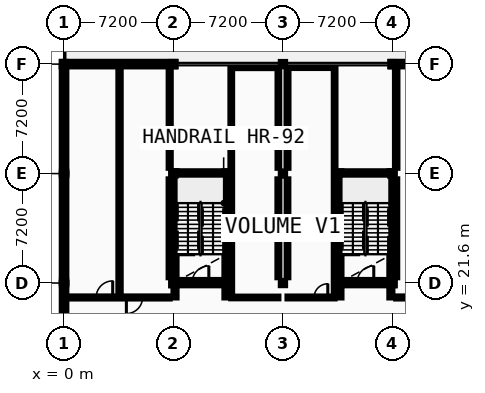
"""IFC4 building model, lengths in metres.
Left out: names, types, materials, properties, quantities, classifications, styles, units other than length and angle.
Written with IfcOpenShell. Run it as: python <this file> out.ifc"""

import sys

from ifc_helpers import new_model, si_unit, direction, frame, frame_2d, origin, origin_2d, place, context, subcontext, project, spatial, rectangle, i_section, extrude, element, fill, save


model = new_model("IFC4")
c1 = context("Model", 3, precision=1e-05, world=origin(), true_north=direction((0.0, 1.0)))
c2 = subcontext(c1, "Body", "Model", "MODEL_VIEW")
j1 = project(units=[si_unit("LENGTHUNIT", "METRE"), si_unit("PLANEANGLEUNIT", "RADIAN")], contexts=[c1])
p1 = place(None, origin())
s1 = spatial("IfcSite", under=j1, at=p1, CompositionType="ELEMENT")
p2 = place(p1, origin())
s2 = spatial("IfcBuilding", under=s1, at=p2, CompositionType="ELEMENT")
p3 = place(p2, frame((0.0, 0.0, 27.2)))
s3 = spatial("IfcBuildingStorey", under=s2, at=p3, CompositionType="ELEMENT", Elevation=27.2)
for number, where, z_axis, x_axis in (
    (1, (0.0, 21.6, 0.0), (0.0, 0.0, 1.0), (1.0, 0.0, 0.0)),
    (2, (0.0, 28.8, 0.0), (0.0, 0.0, 1.0), (1.0, 0.0, 0.0)),
    (3, (0.0, 36.0, 0.0), (0.0, 0.0, 1.0), (1.0, 0.0, 0.0)),
    (4, (7.2, 21.6, 0.0), (0.0, 0.0, 1.0), (1.0, 0.0, 0.0)),
    (5, (7.2, 28.8, 0.0), (0.0, 0.0, 1.0), (1.0, 0.0, 0.0)),
    (6, (7.2, 36.0, 0.0), (0.0, 0.0, 1.0), (1.0, 0.0, 0.0)),
    (7, (14.4, 21.6, 0.0), (0.0, 0.0, 1.0), (1.0, 0.0, 0.0)),
    (8, (14.4, 28.8, 0.0), (0.0, 0.0, 1.0), (1.0, 0.0, 0.0)),
    (9, (14.4, 36.0, 0.0), (0.0, 0.0, 1.0), (1.0, 0.0, 0.0)),
    (10, (21.6, 21.6, 0.0), (0.0, 0.0, 1.0), (1.0, 0.0, 0.0)),
    (11, (21.6, 28.8, 0.0), (0.0, 0.0, 1.0), (1.0, 0.0, 0.0)),
    (12, (21.6, 36.0, 0.0), (0.0, 0.0, 1.0), (1.0, 0.0, 0.0)),
):
    element("IfcColumn", number, at=place(p3, frame(where, z_axis=z_axis, x_axis=x_axis)), inside=s3, PredefinedType="COLUMN", context=c2, shape_type="SweptSolid", body=[
        extrude(i_section(OverallWidth=0.28, OverallDepth=0.28, WebThickness=0.01, FlangeThickness=0.018, FilletRadius=0.024, at=origin_2d()), origin(), (0.0, 0.0, 1.0), 4.4),
    ])
p4 = place(p3, frame((7.31, 36.0, 0.0), z_axis=(0.0, 0.0, 1.0), x_axis=(-1.0, 0.0, 0.0)))
e13 = element("IfcWall", 13, at=p4, inside=s3, PredefinedType="STANDARD", context=c2, shape_type="SweptSolid", body=[
    extrude(rectangle(XDim=7.46, YDim=0.3, at=frame_2d((3.73, 0.0))), origin(), (0.0, 0.0, 1.0), 4.035),
])
p5 = place(p3, frame((28.8, 36.0, 0.0), z_axis=(0.0, 0.0, 1.0), x_axis=(-1.0, 0.0, 0.0)))
e14 = element("IfcWall", 14, at=p5, inside=s3, PredefinedType="STANDARD", context=c2, shape_type="SweptSolid", body=[
    extrude(rectangle(XDim=7.31, YDim=0.3, at=frame_2d((3.655, 0.0))), origin(), (0.0, 0.0, 1.0), 4.035),
])
p6 = place(p5, frame((1.062, 0.0, 0.0)))
e15 = element("IfcOpeningElement", 15, at=p6, cuts=e14, PredefinedType="OPENING", context=c2, shape_type="SweptSolid", body=[
    extrude(rectangle(XDim=1.6, YDim=2.2, at=frame_2d((0.8, 1.1))), frame((0.0, 0.16, 0.0), z_axis=(0.0, -1.0, 0.0), x_axis=(1.0, 0.0, 0.0)), (0.0, 0.0, 1.0), 0.32),
])
p7 = place(p3, frame((0.0, 21.6, 0.0), z_axis=(0.0, 0.0, 1.0), x_axis=(0.0, -1.0, 0.0)))
e16 = element("IfcWall", 16, at=p7, inside=s3, PredefinedType="STANDARD", context=c2, shape_type="SweptSolid", body=[
    extrude(rectangle(XDim=7.15, YDim=0.3, at=frame_2d((3.575, 0.0))), origin(), (0.0, 0.0, 1.0), 4.18),
])
p8 = place(p7, frame((1.596, 0.0, 0.95)))
e17 = element("IfcOpeningElement", 17, at=p8, cuts=e16, PredefinedType="OPENING", context=c2, shape_type="SweptSolid", body=[
    extrude(rectangle(XDim=1.098, YDim=1.26, at=frame_2d((0.549, 0.63))), frame((0.0, 0.16, 0.0), z_axis=(0.0, -1.0, 0.0), x_axis=(1.0, 0.0, 0.0)), (0.0, 0.0, 1.0), 0.32),
])
p9 = place(p7, frame((4.456, 0.0, 0.95)))
e18 = element("IfcOpeningElement", 18, at=p9, cuts=e16, PredefinedType="OPENING", context=c2, shape_type="SweptSolid", body=[
    extrude(rectangle(XDim=1.098, YDim=1.26, at=frame_2d((0.549, 0.63))), frame((0.0, 0.16, 0.0), z_axis=(0.0, -1.0, 0.0), x_axis=(1.0, 0.0, 0.0)), (0.0, 0.0, 1.0), 0.32),
])
p10 = place(p3, frame((0.0, 28.8, 0.0), z_axis=(0.0, 0.0, 1.0), x_axis=(0.0, -1.0, 0.0)))
e19 = element("IfcWall", 19, at=p10, inside=s3, PredefinedType="STANDARD", context=c2, shape_type="SweptSolid", body=[
    extrude(rectangle(XDim=7.2, YDim=0.3, at=frame_2d((3.6, 0.0))), origin(), (0.0, 0.0, 1.0), 4.11),
])
p11 = place(p10, frame((1.594, 0.0, 0.95)))
e20 = element("IfcOpeningElement", 20, at=p11, cuts=e19, PredefinedType="OPENING", context=c2, shape_type="SweptSolid", body=[
    extrude(rectangle(XDim=1.132, YDim=1.26, at=frame_2d((0.566, 0.63))), frame((0.0, 0.16, 0.0), z_axis=(0.0, -1.0, 0.0), x_axis=(1.0, 0.0, 0.0)), (0.0, 0.0, 1.0), 0.32),
])
p12 = place(p10, frame((4.474, 0.0, 0.95)))
e21 = element("IfcOpeningElement", 21, at=p12, cuts=e19, PredefinedType="OPENING", context=c2, shape_type="SweptSolid", body=[
    extrude(rectangle(XDim=1.132, YDim=1.26, at=frame_2d((0.566, 0.63))), frame((0.0, 0.16, 0.0), z_axis=(0.0, -1.0, 0.0), x_axis=(1.0, 0.0, 0.0)), (0.0, 0.0, 1.0), 0.32),
])
p13 = place(p3, frame((0.0, 35.85, 0.0), z_axis=(0.0, 0.0, 1.0), x_axis=(0.0, -1.0, 0.0)))
e22 = element("IfcWall", 22, at=p13, inside=s3, PredefinedType="STANDARD", context=c2, shape_type="SweptSolid", body=[
    extrude(rectangle(XDim=7.05, YDim=0.3, at=frame_2d((3.525, 0.0))), origin(), (0.0, 0.0, 1.0), 4.11),
])
p14 = place(p13, frame((1.532, 0.0, 0.95)))
e23 = element("IfcOpeningElement", 23, at=p14, cuts=e22, PredefinedType="OPENING", context=c2, shape_type="SweptSolid", body=[
    extrude(rectangle(XDim=1.166, YDim=1.26, at=frame_2d((0.583, 0.63))), frame((0.0, 0.16, 0.0), z_axis=(0.0, -1.0, 0.0), x_axis=(1.0, 0.0, 0.0)), (0.0, 0.0, 1.0), 0.32),
])
p15 = place(p13, frame((4.352, 0.0, 0.95)))
e24 = element("IfcOpeningElement", 24, at=p15, cuts=e22, PredefinedType="OPENING", context=c2, shape_type="SweptSolid", body=[
    extrude(rectangle(XDim=1.166, YDim=1.26, at=frame_2d((0.583, 0.63))), frame((0.0, 0.16, 0.0), z_axis=(0.0, -1.0, 0.0), x_axis=(1.0, 0.0, 0.0)), (0.0, 0.0, 1.0), 0.32),
])
p16 = place(p3, frame((7.4, 21.625, 0.0), z_axis=(0.0, 0.0, 1.0), x_axis=(1.0, 0.0, 0.0)))
e25 = element("IfcWall", 25, at=p16, inside=s3, PredefinedType="SHEAR", context=c2, shape_type="SweptSolid", body=[
    extrude(rectangle(XDim=3.15, YDim=0.35, at=frame_2d((1.575, 0.0))), origin(), (0.0, 0.0, 1.0), 4.2),
])
p17 = place(p16, frame((1.025, 0.0, 0.0)))
e26 = element("IfcOpeningElement", 26, at=p17, cuts=e25, PredefinedType="OPENING", context=c2, shape_type="SweptSolid", body=[
    extrude(rectangle(XDim=1.1, YDim=2.15, at=frame_2d((0.55, 1.075))), frame((0.0, 0.185, 0.0), z_axis=(0.0, -1.0, 0.0), x_axis=(1.0, 0.0, 0.0)), (0.0, 0.0, 1.0), 0.37),
])
p18 = place(p3, frame((7.4, 28.775, 0.0), z_axis=(0.0, 0.0, 1.0), x_axis=(1.0, 0.0, 0.0)))
e27 = element("IfcWall", 27, at=p18, inside=s3, PredefinedType="SHEAR", context=c2, shape_type="SweptSolid", body=[
    extrude(rectangle(XDim=3.15, YDim=0.35, at=frame_2d((1.575, 0.0))), origin(), (0.0, 0.0, 1.0), 4.2),
])
for number, where, z_axis, x_axis in (
    (28, (7.225, 21.45, 0.0), (0.0, 0.0, 1.0), (0.0, 1.0, 0.0)),
    (29, (10.725, 21.45, 0.0), (0.0, 0.0, 1.0), (0.0, 1.0, 0.0)),
):
    element("IfcWall", number, at=place(p3, frame(where, z_axis=z_axis, x_axis=x_axis)), inside=s3, PredefinedType="SHEAR", context=c2, shape_type="SweptSolid", body=[
        extrude(rectangle(XDim=7.5, YDim=0.35, at=frame_2d((3.75, 0.0))), origin(), (0.0, 0.0, 1.0), 4.2),
    ])
for number, where, z_axis, x_axis in (
    (30, (7.3, 20.65, 0.0), (0.0, 0.0, 1.0), (0.0, 1.0, 0.0)),
    (31, (10.65, 20.65, 0.0), (0.0, 0.0, 1.0), (0.0, 1.0, 0.0)),
):
    element("IfcWall", number, at=place(p3, frame(where, z_axis=z_axis, x_axis=x_axis)), inside=s3, PredefinedType="PARTITIONING", context=c2, shape_type="SweptSolid", body=[
        extrude(rectangle(XDim=0.8, YDim=0.2, at=frame_2d((0.4, 0.0))), origin(), (0.0, 0.0, 1.0), 3.85),
    ])
p19 = place(p3, frame((18.25, 21.625, 0.0), z_axis=(0.0, 0.0, 1.0), x_axis=(1.0, 0.0, 0.0)))
e32 = element("IfcWall", 32, at=p19, inside=s3, PredefinedType="SHEAR", context=c2, shape_type="SweptSolid", body=[
    extrude(rectangle(XDim=3.15, YDim=0.35, at=frame_2d((1.575, 0.0))), origin(), (0.0, 0.0, 1.0), 4.2),
])
p20 = place(p19, frame((1.025, 0.0, 0.0)))
e33 = element("IfcOpeningElement", 33, at=p20, cuts=e32, PredefinedType="OPENING", context=c2, shape_type="SweptSolid", body=[
    extrude(rectangle(XDim=1.1, YDim=2.15, at=frame_2d((0.55, 1.075))), frame((0.0, 0.185, 0.0), z_axis=(0.0, -1.0, 0.0), x_axis=(1.0, 0.0, 0.0)), (0.0, 0.0, 1.0), 0.37),
])
p21 = place(p3, frame((18.25, 28.775, 0.0), z_axis=(0.0, 0.0, 1.0), x_axis=(1.0, 0.0, 0.0)))
e34 = element("IfcWall", 34, at=p21, inside=s3, PredefinedType="SHEAR", context=c2, shape_type="SweptSolid", body=[
    extrude(rectangle(XDim=3.15, YDim=0.35, at=frame_2d((1.575, 0.0))), origin(), (0.0, 0.0, 1.0), 4.2),
])
for number, where, z_axis, x_axis in (
    (35, (18.075, 21.45, 0.0), (0.0, 0.0, 1.0), (0.0, 1.0, 0.0)),
    (36, (21.575, 21.45, 0.0), (0.0, 0.0, 1.0), (0.0, 1.0, 0.0)),
):
    element("IfcWall", number, at=place(p3, frame(where, z_axis=z_axis, x_axis=x_axis)), inside=s3, PredefinedType="SHEAR", context=c2, shape_type="SweptSolid", body=[
        extrude(rectangle(XDim=7.5, YDim=0.35, at=frame_2d((3.75, 0.0))), origin(), (0.0, 0.0, 1.0), 4.2),
    ])
for number, where, z_axis, x_axis in (
    (37, (18.15, 20.65, 0.0), (0.0, 0.0, 1.0), (0.0, 1.0, 0.0)),
    (38, (21.5, 20.65, 0.0), (0.0, 0.0, 1.0), (0.0, 1.0, 0.0)),
):
    element("IfcWall", number, at=place(p3, frame(where, z_axis=z_axis, x_axis=x_axis)), inside=s3, PredefinedType="PARTITIONING", context=c2, shape_type="SweptSolid", body=[
        extrude(rectangle(XDim=0.8, YDim=0.2, at=frame_2d((0.4, 0.0))), origin(), (0.0, 0.0, 1.0), 3.85),
    ])
p22 = place(p3, frame((0.2, 20.65, 0.0), z_axis=(0.0, 0.0, 1.0), x_axis=(1.0, 0.0, 0.0)))
e39 = element("IfcWall", 39, at=p22, inside=s3, PredefinedType="PARTITIONING", context=c2, shape_type="SweptSolid", body=[
    extrude(rectangle(XDim=6.75, YDim=0.135, at=frame_2d((3.375, 0.0))), origin(), (0.0, 0.0, 1.0), 4.18),
])
p23 = place(p22, frame((3.9, 0.0, 0.0)))
e40 = element("IfcOpeningElement", 40, at=p23, cuts=e39, PredefinedType="OPENING", context=c2, shape_type="SweptSolid", body=[
    extrude(rectangle(XDim=1.062, YDim=2.096, at=frame_2d((0.531, 1.048))), frame((0.0, 0.078, 0.0), z_axis=(0.0, -1.0, 0.0), x_axis=(1.0, 0.0, 0.0)), (0.0, 0.0, 1.0), 0.155),
])
p24 = place(p22, frame((1.912, 0.0, 0.0)))
e41 = element("IfcOpeningElement", 41, at=p24, cuts=e39, PredefinedType="OPENING", context=c2, shape_type="SweptSolid", body=[
    extrude(rectangle(XDim=1.088, YDim=2.096, at=frame_2d((0.544, 1.048))), frame((0.0, 0.078, 0.0), z_axis=(0.0, -1.0, 0.0), x_axis=(1.0, 0.0, 0.0)), (0.0, 0.0, 1.0), 0.155),
])
p25 = place(p3, frame((11.0, 20.65, 0.0), z_axis=(0.0, 0.0, 1.0), x_axis=(1.0, 0.0, 0.0)))
e42 = element("IfcWall", 42, at=p25, inside=s3, PredefinedType="PARTITIONING", context=c2, shape_type="SweptSolid", body=[
    extrude(rectangle(XDim=3.1, YDim=0.11, at=frame_2d((1.55, 0.0))), origin(), (0.0, 0.0, 1.0), 4.18),
])
p26 = place(p25, frame((0.45, 0.0, 0.0)))
e43 = element("IfcOpeningElement", 43, at=p26, cuts=e42, PredefinedType="OPENING", context=c2, shape_type="SweptSolid", body=[
    extrude(rectangle(XDim=1.0, YDim=2.1, at=frame_2d((0.5, 1.05))), frame((0.0, 0.065, 0.0), z_axis=(0.0, -1.0, 0.0), x_axis=(1.0, 0.0, 0.0)), (0.0, 0.0, 1.0), 0.13),
])
p27 = place(p3, frame((14.7, 20.65, 0.0), z_axis=(0.0, 0.0, 1.0), x_axis=(1.0, 0.0, 0.0)))
e44 = element("IfcWall", 44, at=p27, inside=s3, PredefinedType="PARTITIONING", context=c2, shape_type="SweptSolid", body=[
    extrude(rectangle(XDim=3.1, YDim=0.125, at=frame_2d((1.55, 0.0))), origin(), (0.0, 0.0, 1.0), 4.18),
])
p28 = place(p27, frame((1.75, 0.0, 0.0)))
e45 = element("IfcOpeningElement", 45, at=p28, cuts=e44, PredefinedType="OPENING", context=c2, shape_type="SweptSolid", body=[
    extrude(rectangle(XDim=0.9, YDim=2.1, at=frame_2d((0.45, 1.05))), frame((0.0, 0.073, 0.0), z_axis=(0.0, -1.0, 0.0), x_axis=(1.0, 0.0, 0.0)), (0.0, 0.0, 1.0), 0.145),
])
p29 = place(p3, frame((21.85, 20.65, 0.0), z_axis=(0.0, 0.0, 1.0), x_axis=(1.0, 0.0, 0.0)))
e46 = element("IfcWall", 46, at=p29, inside=s3, PredefinedType="PARTITIONING", context=c2, shape_type="SweptSolid", body=[
    extrude(rectangle(XDim=6.75, YDim=0.135, at=frame_2d((3.375, 0.0))), origin(), (0.0, 0.0, 1.0), 4.18),
])
p30 = place(p29, frame((2.818, 0.0, 0.0)))
e47 = element("IfcOpeningElement", 47, at=p30, cuts=e46, PredefinedType="OPENING", context=c2, shape_type="SweptSolid", body=[
    extrude(rectangle(XDim=1.114, YDim=2.096, at=frame_2d((0.557, 1.048))), frame((0.0, 0.078, 0.0), z_axis=(0.0, -1.0, 0.0), x_axis=(1.0, 0.0, 0.0)), (0.0, 0.0, 1.0), 0.155),
])
p31 = place(p3, frame((11.0, 35.8, 0.0), z_axis=(0.0, 0.0, 1.0), x_axis=(1.0, 0.0, 0.0)))
e48 = element("IfcWall", 48, at=p31, inside=s3, PredefinedType="PARTITIONING", context=c2, shape_type="SweptSolid", body=[
    extrude(rectangle(XDim=3.02, YDim=0.125, at=frame_2d((1.51, 0.0))), origin(), (0.0, 0.0, 1.0), 4.035),
])
p32 = place(p3, frame((14.78, 35.8, 0.0), z_axis=(0.0, 0.0, 1.0), x_axis=(1.0, 0.0, 0.0)))
e49 = element("IfcWall", 49, at=p32, inside=s3, PredefinedType="PARTITIONING", context=c2, shape_type="SweptSolid", body=[
    extrude(rectangle(XDim=3.02, YDim=0.11, at=frame_2d((1.51, 0.0))), origin(), (0.0, 0.0, 1.0), 4.035),
])
p33 = place(p3, frame((3.65, 20.718, 0.0), z_axis=(0.0, 0.0, 1.0), x_axis=(0.0, 1.0, 0.0)))
e50 = element("IfcWall", 50, at=p33, inside=s3, PredefinedType="PARTITIONING", context=c2, shape_type="SweptSolid", body=[
    extrude(rectangle(XDim=15.083, YDim=0.15, at=frame_2d((7.541, 0.0))), origin(), (0.0, 0.0, 1.0), 4.18),
])
p34 = place(p3, frame((6.95, 21.98, 0.0), z_axis=(0.0, 0.0, 1.0), x_axis=(0.0, 1.0, 0.0)))
e51 = element("IfcWall", 51, at=p34, inside=s3, PredefinedType="PARTITIONING", context=c2, shape_type="SweptSolid", body=[
    extrude(rectangle(XDim=6.44, YDim=0.142, at=frame_2d((3.22, 0.0))), origin(), (0.0, 0.0, 1.0), 4.18),
])
p35 = place(p3, frame((6.95, 29.18, 0.0), z_axis=(0.0, 0.0, 1.0), x_axis=(0.0, 1.0, 0.0)))
e52 = element("IfcWall", 52, at=p35, inside=s3, PredefinedType="PARTITIONING", context=c2, shape_type="SweptSolid", body=[
    extrude(rectangle(XDim=6.44, YDim=0.135, at=frame_2d((3.22, 0.0))), origin(), (0.0, 0.0, 1.0), 4.18),
])
p36 = place(p3, frame((11.0, 20.705, 0.0), z_axis=(0.0, 0.0, 1.0), x_axis=(0.0, 1.0, 0.0)))
e53 = element("IfcWall", 53, at=p36, inside=s3, PredefinedType="PARTITIONING", context=c2, shape_type="SweptSolid", body=[
    extrude(rectangle(XDim=15.032, YDim=0.11, at=frame_2d((7.516, 0.0))), origin(), (0.0, 0.0, 1.0), 4.18),
])
p37 = place(p3, frame((14.1, 21.98, 0.0), z_axis=(0.0, 0.0, 1.0), x_axis=(0.0, 1.0, 0.0)))
e54 = element("IfcWall", 54, at=p37, inside=s3, PredefinedType="PARTITIONING", context=c2, shape_type="SweptSolid", body=[
    extrude(rectangle(XDim=6.44, YDim=0.125, at=frame_2d((3.22, 0.0))), origin(), (0.0, 0.0, 1.0), 4.18),
])
p38 = place(p3, frame((14.1, 29.18, 0.0), z_axis=(0.0, 0.0, 1.0), x_axis=(0.0, 1.0, 0.0)))
e55 = element("IfcWall", 55, at=p38, inside=s3, PredefinedType="PARTITIONING", context=c2, shape_type="SweptSolid", body=[
    extrude(rectangle(XDim=6.44, YDim=0.11, at=frame_2d((3.22, 0.0))), origin(), (0.0, 0.0, 1.0), 4.18),
])
p39 = place(p3, frame((14.7, 21.98, 0.0), z_axis=(0.0, 0.0, 1.0), x_axis=(0.0, 1.0, 0.0)))
e56 = element("IfcWall", 56, at=p39, inside=s3, PredefinedType="PARTITIONING", context=c2, shape_type="SweptSolid", body=[
    extrude(rectangle(XDim=6.44, YDim=0.11, at=frame_2d((3.22, 0.0))), origin(), (0.0, 0.0, 1.0), 4.18),
])
p40 = place(p3, frame((14.7, 29.18, 0.0), z_axis=(0.0, 0.0, 1.0), x_axis=(0.0, 1.0, 0.0)))
e57 = element("IfcWall", 57, at=p40, inside=s3, PredefinedType="PARTITIONING", context=c2, shape_type="SweptSolid", body=[
    extrude(rectangle(XDim=6.44, YDim=0.125, at=frame_2d((3.22, 0.0))), origin(), (0.0, 0.0, 1.0), 4.18),
])
p41 = place(p3, frame((17.8, 20.712, 0.0), z_axis=(0.0, 0.0, 1.0), x_axis=(0.0, 1.0, 0.0)))
e58 = element("IfcWall", 58, at=p41, inside=s3, PredefinedType="PARTITIONING", context=c2, shape_type="SweptSolid", body=[
    extrude(rectangle(XDim=15.033, YDim=0.11, at=frame_2d((7.516, 0.0))), origin(), (0.0, 0.0, 1.0), 4.18),
])
p42 = place(p3, frame((21.85, 21.98, 0.0), z_axis=(0.0, 0.0, 1.0), x_axis=(0.0, 1.0, 0.0)))
e59 = element("IfcWall", 59, at=p42, inside=s3, PredefinedType="PARTITIONING", context=c2, shape_type="SweptSolid", body=[
    extrude(rectangle(XDim=6.44, YDim=0.135, at=frame_2d((3.22, 0.0))), origin(), (0.0, 0.0, 1.0), 4.18),
])
p43 = place(p3, frame((21.85, 29.18, 0.0), z_axis=(0.0, 0.0, 1.0), x_axis=(0.0, 1.0, 0.0)))
e60 = element("IfcWall", 60, at=p43, inside=s3, PredefinedType="PARTITIONING", context=c2, shape_type="SweptSolid", body=[
    extrude(rectangle(XDim=6.44, YDim=0.16, at=frame_2d((3.22, 0.0))), origin(), (0.0, 0.0, 1.0), 4.18),
])
p44 = place(p8, origin())
e61 = element("IfcWindow", 61, at=p44, inside=s3, PartitioningType="SINGLE_PANEL", PredefinedType="WINDOW", context=c2, shape_type="SweptSolid", body=[
    extrude(rectangle(XDim=1.098, YDim=1.26, at=frame_2d((0.549, 0.63))), frame((0.0, 0.03, 0.0), z_axis=(0.0, -1.0, 0.0), x_axis=(1.0, 0.0, 0.0)), (0.0, 0.0, 1.0), 0.06),
])
fill(e17, e61)
p45 = place(p11, origin())
e62 = element("IfcWindow", 62, at=p45, inside=s3, PartitioningType="SINGLE_PANEL", PredefinedType="WINDOW", context=c2, shape_type="SweptSolid", body=[
    extrude(rectangle(XDim=1.132, YDim=1.26, at=frame_2d((0.566, 0.63))), frame((0.0, 0.03, 0.0), z_axis=(0.0, -1.0, 0.0), x_axis=(1.0, 0.0, 0.0)), (0.0, 0.0, 1.0), 0.06),
])
fill(e20, e62)
p46 = place(p12, origin())
e63 = element("IfcWindow", 63, at=p46, inside=s3, PartitioningType="SINGLE_PANEL", PredefinedType="WINDOW", context=c2, shape_type="SweptSolid", body=[
    extrude(rectangle(XDim=1.132, YDim=1.26, at=frame_2d((0.566, 0.63))), frame((0.0, 0.03, 0.0), z_axis=(0.0, -1.0, 0.0), x_axis=(1.0, 0.0, 0.0)), (0.0, 0.0, 1.0), 0.06),
])
fill(e21, e63)
p47 = place(p14, origin())
e64 = element("IfcWindow", 64, at=p47, inside=s3, PartitioningType="SINGLE_PANEL", PredefinedType="WINDOW", context=c2, shape_type="SweptSolid", body=[
    extrude(rectangle(XDim=1.166, YDim=1.26, at=frame_2d((0.583, 0.63))), frame((0.0, 0.03, 0.0), z_axis=(0.0, -1.0, 0.0), x_axis=(1.0, 0.0, 0.0)), (0.0, 0.0, 1.0), 0.06),
])
fill(e23, e64)
p48 = place(p15, origin())
e65 = element("IfcWindow", 65, at=p48, inside=s3, PartitioningType="SINGLE_PANEL", PredefinedType="WINDOW", context=c2, shape_type="SweptSolid", body=[
    extrude(rectangle(XDim=1.166, YDim=1.26, at=frame_2d((0.583, 0.63))), frame((0.0, 0.03, 0.0), z_axis=(0.0, -1.0, 0.0), x_axis=(1.0, 0.0, 0.0)), (0.0, 0.0, 1.0), 0.06),
])
fill(e24, e65)
p49 = place(p17, frame((1.1, 0.0, 0.0), z_axis=(0.0, 0.0, 1.0), x_axis=(-1.0, 0.0, 0.0)))
e66 = element("IfcDoor", 66, at=p49, inside=s3, OperationType="SINGLE_SWING_RIGHT", PredefinedType="DOOR", context=c2, shape_type="SweptSolid", body=[
    extrude(rectangle(XDim=1.1, YDim=2.15, at=frame_2d((0.55, 1.075))), frame((0.0, 0.025, 0.0), z_axis=(0.0, -1.0, 0.0), x_axis=(1.0, 0.0, 0.0)), (0.0, 0.0, 1.0), 0.05),
])
fill(e26, e66)
p50 = place(p20, frame((1.1, 0.0, 0.0), z_axis=(0.0, 0.0, 1.0), x_axis=(-1.0, 0.0, 0.0)))
e67 = element("IfcDoor", 67, at=p50, inside=s3, OperationType="SINGLE_SWING_RIGHT", PredefinedType="DOOR", context=c2, shape_type="SweptSolid", body=[
    extrude(rectangle(XDim=1.1, YDim=2.15, at=frame_2d((0.55, 1.075))), frame((0.0, 0.025, 0.0), z_axis=(0.0, -1.0, 0.0), x_axis=(1.0, 0.0, 0.0)), (0.0, 0.0, 1.0), 0.05),
])
fill(e33, e67)
p51 = place(p26, frame((1.0, 0.0, 0.0), z_axis=(0.0, 0.0, 1.0), x_axis=(-1.0, 0.0, 0.0)))
e68 = element("IfcDoor", 68, at=p51, inside=s3, OperationType="SLIDING_TO_LEFT", PredefinedType="DOOR", context=c2, shape_type="SweptSolid", body=[
    extrude(rectangle(XDim=1.0, YDim=2.1, at=frame_2d((0.5, 1.05))), frame((0.0, 0.025, 0.0), z_axis=(0.0, -1.0, 0.0), x_axis=(1.0, 0.0, 0.0)), (0.0, 0.0, 1.0), 0.05),
])
fill(e43, e68)
p52 = place(p28, frame((0.9, 0.0, 0.0), z_axis=(0.0, 0.0, 1.0), x_axis=(-1.0, 0.0, 0.0)))
e69 = element("IfcDoor", 69, at=p52, inside=s3, OperationType="SINGLE_SWING_RIGHT", PredefinedType="DOOR", context=c2, shape_type="SweptSolid", body=[
    extrude(rectangle(XDim=0.9, YDim=2.1, at=frame_2d((0.45, 1.05))), frame((0.0, 0.025, 0.0), z_axis=(0.0, -1.0, 0.0), x_axis=(1.0, 0.0, 0.0)), (0.0, 0.0, 1.0), 0.05),
])
fill(e45, e69)
p53 = place(p23, frame((1.062, 0.0, 0.0), z_axis=(0.0, 0.0, 1.0), x_axis=(-1.0, 0.0, 0.0)))
e70 = element("IfcDoor", 70, at=p53, inside=s3, OperationType="SINGLE_SWING_LEFT", PredefinedType="DOOR", context=c2, shape_type="SweptSolid", body=[
    extrude(rectangle(XDim=1.062, YDim=2.096, at=frame_2d((0.531, 1.048))), frame((0.0, 0.025, 0.0), z_axis=(0.0, -1.0, 0.0), x_axis=(1.0, 0.0, 0.0)), (0.0, 0.0, 1.0), 0.05),
])
fill(e40, e70)
p54 = place(p24, frame((1.088, 0.0, 0.0), z_axis=(0.0, 0.0, 1.0), x_axis=(-1.0, 0.0, 0.0)))
e71 = element("IfcDoor", 71, at=p54, inside=s3, OperationType="SINGLE_SWING_RIGHT", PredefinedType="DOOR", context=c2, shape_type="SweptSolid", body=[
    extrude(rectangle(XDim=1.088, YDim=2.096, at=frame_2d((0.544, 1.048))), frame((0.0, 0.025, 0.0), z_axis=(0.0, -1.0, 0.0), x_axis=(1.0, 0.0, 0.0)), (0.0, 0.0, 1.0), 0.05),
])
fill(e41, e71)
save(model, sys.argv[1])
